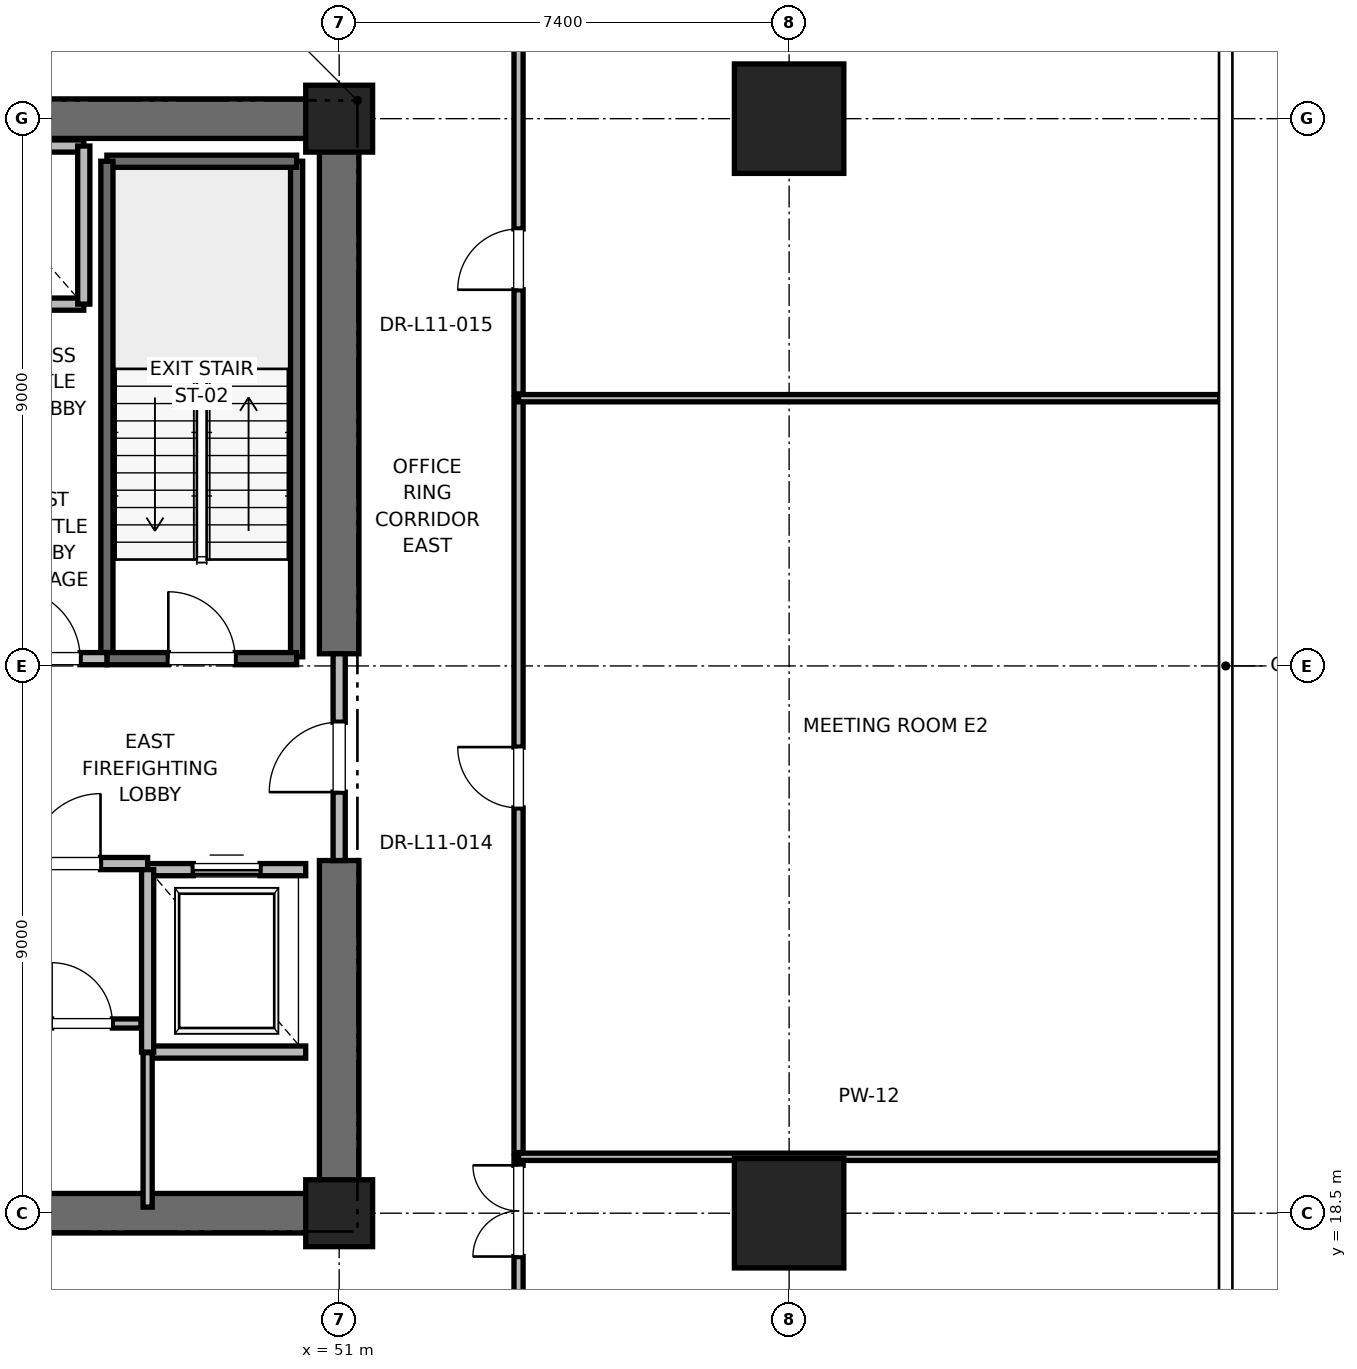
"""IFC4 building model, lengths in metres.
Left out: names, types, materials, properties, quantities, classifications, styles, units other than length and angle.
Written with IfcOpenShell. Run it as: python <this file> out.ifc"""

import sys

from ifc_helpers import new_model, si_unit, direction, frame, frame_2d, origin, origin_2d, place, context, subcontext, project, spatial, rectangle, extrude, element, fill, save


model = new_model("IFC4")
c1 = context("Model", 3, precision=1e-05, world=origin(), true_north=direction((0.0, 1.0)))
c2 = subcontext(c1, "Body", "Model", "MODEL_VIEW")
j1 = project(units=[si_unit("LENGTHUNIT", "METRE"), si_unit("PLANEANGLEUNIT", "RADIAN")], contexts=[c1])
p1 = place(None, origin())
s1 = spatial("IfcSite", under=j1, at=p1, CompositionType="ELEMENT")
p2 = place(p1, origin())
s2 = spatial("IfcBuilding", under=s1, at=p2, CompositionType="ELEMENT")
p3 = place(p2, frame((0.0, 0.0, 51.6)))
s3 = spatial("IfcBuildingStorey", under=s2, at=p3, CompositionType="ELEMENT", Elevation=51.6)
for number, where, z_axis, x_axis in (
    (1, (58.4, 18.5, 0.0), (0.0, 0.0, 1.0), (1.0, 0.0, 0.0)),
    (2, (58.4, 36.5, 0.0), (0.0, 0.0, 1.0), (1.0, 0.0, 0.0)),
):
    element("IfcColumn", number, at=place(p3, frame(where, z_axis=z_axis, x_axis=x_axis)), inside=s3, PredefinedType="COLUMN", context=c2, shape_type="SweptSolid", body=[
        extrude(rectangle(XDim=1.8, YDim=1.8, at=origin_2d()), origin(), (0.0, 0.0, 1.0), 4.0),
    ])
for number, where, z_axis, x_axis in (
    (3, (51.0, 18.5, 0.0), (0.0, 0.0, 1.0), (1.0, 0.0, 0.0)),
    (4, (51.0, 36.5, 0.0), (0.0, 0.0, 1.0), (1.0, 0.0, 0.0)),
):
    element("IfcColumn", number, at=place(p3, frame(where, z_axis=z_axis, x_axis=x_axis)), inside=s3, PredefinedType="PILASTER", context=c2, shape_type="SweptSolid", body=[
        extrude(rectangle(XDim=1.1, YDim=1.1, at=origin_2d()), origin(), (0.0, 0.0, 1.0), 4.0),
    ])
p4 = place(p3, frame((41.8, 18.5, 0.0), z_axis=(0.0, 0.0, 1.0), x_axis=(1.0, 0.0, 0.0)))
e5 = element("IfcWall", 5, at=p4, inside=s3, PredefinedType="SHEAR", context=c2, shape_type="SweptSolid", body=[
    extrude(rectangle(XDim=9.2, YDim=0.65, at=frame_2d((4.6, 0.0))), origin(), (0.0, 0.0, 1.0), 3.76),
])
for number, where, z_axis, x_axis in (
    (6, (45.2, 36.5, 0.0), (0.0, 0.0, 1.0), (1.0, 0.0, 0.0)),
    (7, (51.0, 18.5, 0.0), (0.0, 0.0, 1.0), (0.0, 1.0, 0.0)),
):
    element("IfcWall", number, at=place(p3, frame(where, z_axis=z_axis, x_axis=x_axis)), inside=s3, PredefinedType="SHEAR", context=c2, shape_type="SweptSolid", body=[
        extrude(rectangle(XDim=5.8, YDim=0.65, at=frame_2d((2.9, 0.0))), origin(), (0.0, 0.0, 1.0), 3.76),
    ])
p5 = place(p3, frame((51.0, 27.7, 0.0), z_axis=(0.0, 0.0, 1.0), x_axis=(0.0, 1.0, 0.0)))
e8 = element("IfcWall", 8, at=p5, inside=s3, PredefinedType="SHEAR", context=c2, shape_type="SweptSolid", body=[
    extrude(rectangle(XDim=8.8, YDim=0.65, at=frame_2d((4.4, 0.0))), origin(), (0.0, 0.0, 1.0), 3.76),
])
p6 = place(p3, frame((50.3, 27.65, 0.0), z_axis=(0.0, 0.0, 1.0), x_axis=(0.0, 1.0, 0.0)))
e9 = element("IfcWall", 9, at=p6, inside=s3, PredefinedType="SOLIDWALL", context=c2, shape_type="SweptSolid", body=[
    extrude(rectangle(XDim=8.15, YDim=0.2, at=frame_2d((4.075, 0.0))), origin(), (0.0, 0.0, 1.0), 3.76),
])
p7 = place(p3, frame((47.18, 35.8, 0.0), z_axis=(0.0, 0.0, 1.0), x_axis=(1.0, 0.0, 0.0)))
e10 = element("IfcWall", 10, at=p7, inside=s3, PredefinedType="SOLIDWALL", context=c2, shape_type="SweptSolid", body=[
    extrude(rectangle(XDim=3.12, YDim=0.2, at=frame_2d((1.56, 0.0))), origin(), (0.0, 0.0, 1.0), 3.76),
])
p8 = place(p3, frame((47.18, 27.62, 0.0), z_axis=(0.0, 0.0, 1.0), x_axis=(0.0, 1.0, 0.0)))
e11 = element("IfcWall", 11, at=p8, inside=s3, PredefinedType="SOLIDWALL", context=c2, shape_type="SweptSolid", body=[
    extrude(rectangle(XDim=8.18, YDim=0.2, at=frame_2d((4.09, 0.0))), origin(), (0.0, 0.0, 1.0), 3.76),
])
p9 = place(p3, frame((47.18, 27.62, 0.0), z_axis=(0.0, 0.0, 1.0), x_axis=(1.0, 0.0, 0.0)))
e12 = element("IfcWall", 12, at=p9, inside=s3, PredefinedType="SOLIDWALL", context=c2, shape_type="SweptSolid", body=[
    extrude(rectangle(XDim=3.12, YDim=0.2, at=frame_2d((1.56, 0.0))), origin(), (0.0, 0.0, 1.0), 3.76),
])
p10 = place(p9, frame((1.01, 0.0, 0.0)))
e13 = element("IfcOpeningElement", 13, at=p10, cuts=e12, PredefinedType="OPENING", context=c2, shape_type="SweptSolid", body=[
    extrude(rectangle(XDim=1.1, YDim=2.15, at=frame_2d((0.55, 1.075))), frame((0.0, 0.1, 0.0), z_axis=(0.0, -1.0, 0.0), x_axis=(1.0, 0.0, 0.0)), (0.0, 0.0, 1.0), 0.2),
])
p11 = place(p3, frame((45.15, 24.25, 0.0), z_axis=(0.0, 0.0, 1.0), x_axis=(1.0, 0.0, 0.0)))
e14 = element("IfcWall", 14, at=p11, inside=s3, PredefinedType="PARTITIONING", context=c2, shape_type="SweptSolid", body=[
    extrude(rectangle(XDim=2.7, YDim=0.2, at=frame_2d((1.35, 0.0))), origin(), (0.0, 0.0, 1.0), 3.76),
])
p12 = place(p11, frame((0.775, 0.0, 0.0)))
e15 = element("IfcOpeningElement", 15, at=p12, cuts=e14, PredefinedType="OPENING", context=c2, shape_type="SweptSolid", body=[
    extrude(rectangle(XDim=1.15, YDim=2.2, at=frame_2d((0.575, 1.1))), frame((0.0, 0.1, 0.0), z_axis=(0.0, -1.0, 0.0), x_axis=(1.0, 0.0, 0.0)), (0.0, 0.0, 1.0), 0.2),
])
p13 = place(p3, frame((45.15, 27.62, 0.0), z_axis=(0.0, 0.0, 1.0), x_axis=(1.0, 0.0, 0.0)))
e16 = element("IfcWall", 16, at=p13, inside=s3, PredefinedType="PARTITIONING", context=c2, shape_type="SweptSolid", body=[
    extrude(rectangle(XDim=2.03, YDim=0.2, at=frame_2d((1.015, 0.0))), origin(), (0.0, 0.0, 1.0), 3.76),
])
p14 = place(p13, frame((0.44, 0.0, 0.0)))
e17 = element("IfcOpeningElement", 17, at=p14, cuts=e16, PredefinedType="OPENING", context=c2, shape_type="SweptSolid", body=[
    extrude(rectangle(XDim=1.15, YDim=2.2, at=frame_2d((0.575, 1.1))), frame((0.0, 0.1, 0.0), z_axis=(0.0, -1.0, 0.0), x_axis=(1.0, 0.0, 0.0)), (0.0, 0.0, 1.0), 0.2),
])
p15 = place(p3, frame((51.0, 24.3, 0.0), z_axis=(0.0, 0.0, 1.0), x_axis=(0.0, 1.0, 0.0)))
e18 = element("IfcWall", 18, at=p15, inside=s3, PredefinedType="PARTITIONING", context=c2, shape_type="SweptSolid", body=[
    extrude(rectangle(XDim=3.4, YDim=0.2, at=frame_2d((1.7, 0.0))), origin(), (0.0, 0.0, 1.0), 2.54),
])
p16 = place(p15, frame((1.125, 0.0, 0.0)))
e19 = element("IfcOpeningElement", 19, at=p16, cuts=e18, PredefinedType="OPENING", context=c2, shape_type="SweptSolid", body=[
    extrude(rectangle(XDim=1.15, YDim=2.2, at=frame_2d((0.575, 1.1))), frame((0.0, 0.1, 0.0), z_axis=(0.0, -1.0, 0.0), x_axis=(1.0, 0.0, 0.0)), (0.0, 0.0, 1.0), 0.2),
])
p17 = place(p3, frame((47.85, 21.15, 0.0), z_axis=(0.0, 0.0, 1.0), x_axis=(1.0, 0.0, 0.0)))
e20 = element("IfcWall", 20, at=p17, inside=s3, PredefinedType="SOLIDWALL", context=c2, shape_type="SweptSolid", body=[
    extrude(rectangle(XDim=2.6, YDim=0.2, at=frame_2d((1.3, 0.0))), origin(), (0.0, 0.0, 1.0), 3.76),
])
p18 = place(p3, frame((50.45, 24.15, 0.0), z_axis=(0.0, 0.0, 1.0), x_axis=(-1.0, 0.0, 0.0)))
e21 = element("IfcWall", 21, at=p18, inside=s3, PredefinedType="SOLIDWALL", context=c2, shape_type="SweptSolid", body=[
    extrude(rectangle(XDim=2.6, YDim=0.2, at=frame_2d((1.3, 0.0))), origin(), (0.0, 0.0, 1.0), 2.54),
])
p19 = place(p18, frame((0.75, 0.0, 0.0)))
e22 = element("IfcOpeningElement", 22, at=p19, cuts=e21, PredefinedType="OPENING", context=c2, shape_type="SweptSolid", body=[
    extrude(rectangle(XDim=1.1, YDim=2.2, at=frame_2d((0.55, 1.1))), frame((0.0, 0.1, 0.0), z_axis=(0.0, -1.0, 0.0), x_axis=(1.0, 0.0, 0.0)), (0.0, 0.0, 1.0), 0.2),
])
p20 = place(p3, frame((47.85, 24.15, 0.0), z_axis=(0.0, 0.0, 1.0), x_axis=(0.0, -1.0, 0.0)))
e23 = element("IfcWall", 23, at=p20, inside=s3, PredefinedType="SOLIDWALL", context=c2, shape_type="SweptSolid", body=[
    extrude(rectangle(XDim=3.0, YDim=0.2, at=frame_2d((1.5, 0.0))), origin(), (0.0, 0.0, 1.0), 3.76),
])
p21 = place(p3, frame((44.5, 33.45, 0.0), z_axis=(0.0, 0.0, 1.0), x_axis=(1.0, 0.0, 0.0)))
e24 = element("IfcWall", 24, at=p21, inside=s3, PredefinedType="SOLIDWALL", context=c2, shape_type="SweptSolid", body=[
    extrude(rectangle(XDim=2.3, YDim=0.2, at=frame_2d((1.15, 0.0))), origin(), (0.0, 0.0, 1.0), 3.76),
])
p22 = place(p3, frame((46.8, 36.05, 0.0), z_axis=(0.0, 0.0, 1.0), x_axis=(-1.0, 0.0, 0.0)))
e25 = element("IfcWall", 25, at=p22, inside=s3, PredefinedType="SOLIDWALL", context=c2, shape_type="SweptSolid", body=[
    extrude(rectangle(XDim=2.3, YDim=0.2, at=frame_2d((1.15, 0.0))), origin(), (0.0, 0.0, 1.0), 2.54),
])
p23 = place(p3, frame((46.8, 33.45, 0.0), z_axis=(0.0, 0.0, 1.0), x_axis=(0.0, 1.0, 0.0)))
e26 = element("IfcWall", 26, at=p23, inside=s3, PredefinedType="SOLIDWALL", context=c2, shape_type="SweptSolid", body=[
    extrude(rectangle(XDim=2.6, YDim=0.2, at=frame_2d((1.3, 0.0))), origin(), (0.0, 0.0, 1.0), 3.76),
])
p24 = place(p3, frame((47.85, 18.6, 0.0), z_axis=(0.0, 0.0, 1.0), x_axis=(0.0, 1.0, 0.0)))
e27 = element("IfcWall", 27, at=p24, inside=s3, PredefinedType="PARTITIONING", context=c2, shape_type="SweptSolid", body=[
    extrude(rectangle(XDim=2.54, YDim=0.15, at=frame_2d((1.27, 0.0))), origin(), (0.0, 0.0, 1.0), 2.85),
])
p25 = place(p3, frame((45.8, 21.62, 0.0), z_axis=(0.0, 0.0, 1.0), x_axis=(1.0, 0.0, 0.0)))
e28 = element("IfcWall", 28, at=p25, inside=s3, PredefinedType="PARTITIONING", context=c2, shape_type="SweptSolid", body=[
    extrude(rectangle(XDim=1.94, YDim=0.15, at=frame_2d((0.97, 0.0))), origin(), (0.0, 0.0, 1.0), 2.85),
])
p26 = place(p25, frame((0.47, 0.0, 0.0)))
e29 = element("IfcOpeningElement", 29, at=p26, cuts=e28, PredefinedType="OPENING", context=c2, shape_type="SweptSolid", body=[
    extrude(rectangle(XDim=1.0, YDim=2.15, at=frame_2d((0.5, 1.075))), frame((0.0, 0.075, 0.0), z_axis=(0.0, -1.0, 0.0), x_axis=(1.0, 0.0, 0.0)), (0.0, 0.0, 1.0), 0.15),
])
p27 = place(p3, frame((53.95, 9.154, 0.0), z_axis=(0.0, 0.0, 1.0), x_axis=(0.0, 1.0, 0.0)))
e30 = element("IfcWall", 30, at=p27, inside=s3, PredefinedType="PARTITIONING", context=c2, shape_type="SweptSolid", body=[
    extrude(rectangle(XDim=10.274, YDim=0.15, at=frame_2d((5.137, 0.0))), origin(), (0.0, 0.0, 1.0), 2.85),
])
p28 = place(p27, frame((8.634, 0.0, 0.0)))
e31 = element("IfcOpeningElement", 31, at=p28, cuts=e30, PredefinedType="OPENING", context=c2, shape_type="SweptSolid", body=[
    extrude(rectangle(XDim=1.5, YDim=2.25, at=frame_2d((0.75, 1.125))), frame((0.0, 0.075, 0.0), z_axis=(0.0, -1.0, 0.0), x_axis=(1.0, 0.0, 0.0)), (0.0, 0.0, 1.0), 0.15),
])
p29 = place(p3, frame((53.95, 19.428, 0.0), z_axis=(0.0, 0.0, 1.0), x_axis=(1.0, 0.0, 0.0)))
e32 = element("IfcWall", 32, at=p29, inside=s3, PredefinedType="PARTITIONING", context=c2, shape_type="SweptSolid", body=[
    extrude(rectangle(XDim=11.53, YDim=0.12, at=frame_2d((5.765, 0.0))), origin(), (0.0, 0.0, 1.0), 2.85),
])
p30 = place(p3, frame((53.95, 19.498, 0.0), z_axis=(0.0, 0.0, 1.0), x_axis=(0.0, 1.0, 0.0)))
e33 = element("IfcWall", 33, at=p30, inside=s3, PredefinedType="PARTITIONING", context=c2, shape_type="SweptSolid", body=[
    extrude(rectangle(XDim=12.405, YDim=0.15, at=frame_2d((6.203, 0.0))), origin(), (0.0, 0.0, 1.0), 2.85),
])
p31 = place(p30, frame((5.668, 0.0, 0.0)))
e34 = element("IfcOpeningElement", 34, at=p31, cuts=e33, PredefinedType="OPENING", context=c2, shape_type="SweptSolid", body=[
    extrude(rectangle(XDim=1.0, YDim=2.15, at=frame_2d((0.5, 1.075))), frame((0.0, 0.075, 0.0), z_axis=(0.0, -1.0, 0.0), x_axis=(1.0, 0.0, 0.0)), (0.0, 0.0, 1.0), 0.15),
])
p32 = place(p3, frame((53.95, 31.903, 0.0), z_axis=(0.0, 0.0, 1.0), x_axis=(1.0, 0.0, 0.0)))
e35 = element("IfcWall", 35, at=p32, inside=s3, PredefinedType="PARTITIONING", context=c2, shape_type="SweptSolid", body=[
    extrude(rectangle(XDim=11.53, YDim=0.12, at=frame_2d((5.765, 0.0))), origin(), (0.0, 0.0, 1.0), 2.85),
])
p33 = place(p3, frame((53.95, 31.973, 0.0), z_axis=(0.0, 0.0, 1.0), x_axis=(0.0, 1.0, 0.0)))
e36 = element("IfcWall", 36, at=p33, inside=s3, PredefinedType="PARTITIONING", context=c2, shape_type="SweptSolid", body=[
    extrude(rectangle(XDim=13.873, YDim=0.15, at=frame_2d((6.937, 0.0))), origin(), (0.0, 0.0, 1.0), 2.85),
])
p34 = place(p33, frame((1.713, 0.0, 0.0)))
e37 = element("IfcOpeningElement", 37, at=p34, cuts=e36, PredefinedType="OPENING", context=c2, shape_type="SweptSolid", body=[
    extrude(rectangle(XDim=1.0, YDim=2.15, at=frame_2d((0.5, 1.075))), frame((0.0, 0.075, 0.0), z_axis=(0.0, -1.0, 0.0), x_axis=(1.0, 0.0, 0.0)), (0.0, 0.0, 1.0), 0.15),
])
p35 = place(p10, origin())
e38 = element("IfcDoor", 38, at=p35, inside=s3, OperationType="SINGLE_SWING_LEFT", PredefinedType="DOOR", context=c2, shape_type="SweptSolid", body=[
    extrude(rectangle(XDim=1.1, YDim=2.15, at=frame_2d((0.55, 1.075))), frame((0.0, 0.025, 0.0), z_axis=(0.0, -1.0, 0.0), x_axis=(1.0, 0.0, 0.0)), (0.0, 0.0, 1.0), 0.05),
])
fill(e13, e38)
p36 = place(p12, origin())
e39 = element("IfcDoor", 39, at=p36, inside=s3, OperationType="SINGLE_SWING_RIGHT", PredefinedType="DOOR", context=c2, shape_type="SweptSolid", body=[
    extrude(rectangle(XDim=1.15, YDim=2.2, at=frame_2d((0.575, 1.1))), frame((0.0, 0.025, 0.0), z_axis=(0.0, -1.0, 0.0), x_axis=(1.0, 0.0, 0.0)), (0.0, 0.0, 1.0), 0.05),
])
fill(e15, e39)
p37 = place(p14, origin())
e40 = element("IfcDoor", 40, at=p37, inside=s3, OperationType="SINGLE_SWING_LEFT", PredefinedType="DOOR", context=c2, shape_type="SweptSolid", body=[
    extrude(rectangle(XDim=1.15, YDim=2.2, at=frame_2d((0.575, 1.1))), frame((0.0, 0.025, 0.0), z_axis=(0.0, -1.0, 0.0), x_axis=(1.0, 0.0, 0.0)), (0.0, 0.0, 1.0), 0.05),
])
fill(e17, e40)
p38 = place(p16, origin())
e41 = element("IfcDoor", 41, at=p38, inside=s3, OperationType="SINGLE_SWING_LEFT", PredefinedType="DOOR", context=c2, shape_type="SweptSolid", body=[
    extrude(rectangle(XDim=1.15, YDim=2.2, at=frame_2d((0.575, 1.1))), frame((0.0, 0.025, 0.0), z_axis=(0.0, -1.0, 0.0), x_axis=(1.0, 0.0, 0.0)), (0.0, 0.0, 1.0), 0.05),
])
fill(e19, e41)
p39 = place(p19, origin())
e42 = element("IfcDoor", 42, at=p39, inside=s3, OperationType="SLIDING_TO_RIGHT", PredefinedType="DOOR", context=c2, shape_type="SweptSolid", body=[
    extrude(rectangle(XDim=1.1, YDim=2.2, at=frame_2d((0.55, 1.1))), frame((0.0, 0.025, 0.0), z_axis=(0.0, -1.0, 0.0), x_axis=(1.0, 0.0, 0.0)), (0.0, 0.0, 1.0), 0.05),
])
fill(e22, e42)
p40 = place(p26, origin())
e43 = element("IfcDoor", 43, at=p40, inside=s3, OperationType="SINGLE_SWING_LEFT", PredefinedType="DOOR", context=c2, shape_type="SweptSolid", body=[
    extrude(rectangle(XDim=1.0, YDim=2.15, at=frame_2d((0.5, 1.075))), frame((0.0, 0.025, 0.0), z_axis=(0.0, -1.0, 0.0), x_axis=(1.0, 0.0, 0.0)), (0.0, 0.0, 1.0), 0.05),
])
fill(e29, e43)
p41 = place(p28, origin())
e44 = element("IfcDoor", 44, at=p41, inside=s3, OperationType="DOUBLE_DOOR_SINGLE_SWING", PredefinedType="DOOR", context=c2, shape_type="SweptSolid", body=[
    extrude(rectangle(XDim=1.5, YDim=2.25, at=frame_2d((0.75, 1.125))), frame((0.0, 0.025, 0.0), z_axis=(0.0, -1.0, 0.0), x_axis=(1.0, 0.0, 0.0)), (0.0, 0.0, 1.0), 0.05),
])
fill(e31, e44)
p42 = place(p31, origin())
e45 = element("IfcDoor", 45, at=p42, inside=s3, OperationType="SINGLE_SWING_RIGHT", PredefinedType="DOOR", context=c2, shape_type="SweptSolid", body=[
    extrude(rectangle(XDim=1.0, YDim=2.15, at=frame_2d((0.5, 1.075))), frame((0.0, 0.025, 0.0), z_axis=(0.0, -1.0, 0.0), x_axis=(1.0, 0.0, 0.0)), (0.0, 0.0, 1.0), 0.05),
])
fill(e34, e45)
p43 = place(p34, origin())
e46 = element("IfcDoor", 46, at=p43, inside=s3, OperationType="SINGLE_SWING_LEFT", PredefinedType="DOOR", context=c2, shape_type="SweptSolid", body=[
    extrude(rectangle(XDim=1.0, YDim=2.15, at=frame_2d((0.5, 1.075))), frame((0.0, 0.025, 0.0), z_axis=(0.0, -1.0, 0.0), x_axis=(1.0, 0.0, 0.0)), (0.0, 0.0, 1.0), 0.05),
])
fill(e37, e46)
save(model, sys.argv[1])
